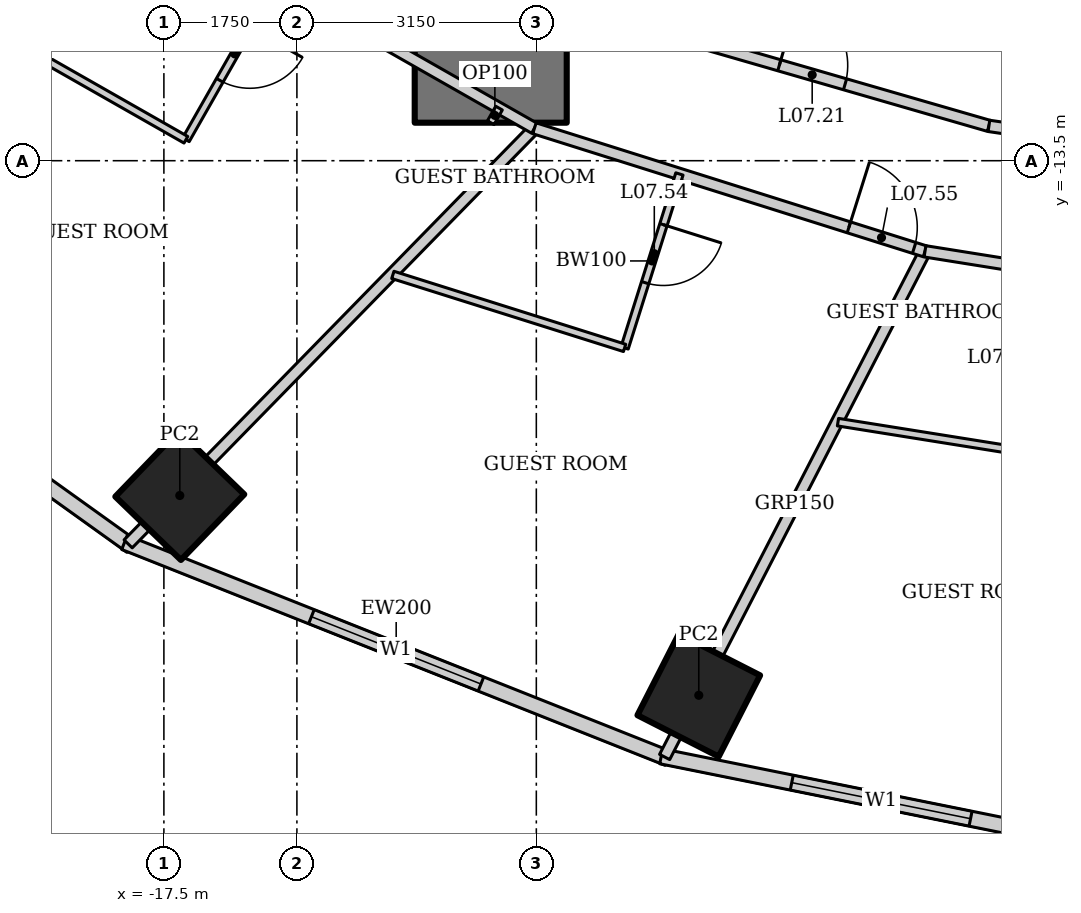
"""IFC4 building model, lengths in metres.
Left out: names, types, materials, properties, quantities, classifications, styles, units other than length and angle.
Written with IfcOpenShell. Run it as: python <this file> out.ifc"""

import sys

from ifc_helpers import new_model, si_unit, direction, frame, frame_2d, origin, origin_2d, place, context, subcontext, project, spatial, rectangle, hollow_rectangle, extrude, element, fill, save


model = new_model("IFC4")
c1 = context("Model", 3, precision=1e-05, world=origin(), true_north=direction((0.0, 1.0)))
c2 = subcontext(c1, "Body", "Model", "MODEL_VIEW")
j1 = project(units=[si_unit("LENGTHUNIT", "METRE"), si_unit("PLANEANGLEUNIT", "RADIAN")], contexts=[c1])
p1 = place(None, origin())
s1 = spatial("IfcSite", under=j1, at=p1, CompositionType="ELEMENT")
p2 = place(p1, origin())
s2 = spatial("IfcBuilding", under=s1, at=p2, CompositionType="ELEMENT")
p3 = place(p2, frame((0.0, 0.0, 40.6)))
s3 = spatial("IfcBuildingStorey", under=s2, at=p3, CompositionType="ELEMENT", Elevation=40.6)
for number, where, z_axis, x_axis in (
    (1, (-17.291, -17.905, 0.0), (0.0, 0.0, 1.0), (0.695, 0.719, 0.0)),
    (2, (-10.463, -20.534, 0.0), (0.0, 0.0, 1.0), (0.454, 0.891, 0.0)),
):
    element("IfcColumn", number, at=place(p3, frame(where, z_axis=z_axis, x_axis=x_axis)), inside=s3, PredefinedType="COLUMN", context=c2, shape_type="SweptSolid", body=[
        extrude(hollow_rectangle(XDim=1.2, YDim=1.2, WallThickness=0.1, at=origin_2d()), origin(), (0.0, 0.0, 1.0), 3.6),
    ])
p4 = place(p3, frame((-13.2, 13.0, 0.0), z_axis=(0.0, 0.0, 1.0), x_axis=(0.0, -1.0, 0.0)))
e3 = element("IfcWall", 3, at=p4, inside=s3, PredefinedType="SHEAR", context=c2, shape_type="SweptSolid", body=[
    extrude(rectangle(XDim=26.0, YDim=2.0, at=frame_2d((13.0, 0.0))), origin(), (0.0, 0.0, 1.0), 3.6),
])
p5 = place(p4, frame((12.1, 0.0, 0.0)))
e4 = element("IfcOpeningElement", 4, at=p5, cuts=e3, PredefinedType="OPENING", context=c2, shape_type="SweptSolid", body=[
    extrude(rectangle(XDim=1.8, YDim=2.1, at=frame_2d((0.9, 1.05))), frame((0.0, 1.01, 0.0), z_axis=(0.0, -1.0, 0.0), x_axis=(1.0, 0.0, 0.0)), (0.0, 0.0, 1.0), 2.02),
])
p6 = place(p3, frame((-24.482, -13.875, 0.0), z_axis=(0.0, 0.0, 1.0), x_axis=(0.812791321576, -0.582554948112, 0.0)))
e5 = element("IfcWall", 5, at=p6, inside=s3, PredefinedType="SOLIDWALL", context=c2, shape_type="SweptSolid", body=[
    extrude(rectangle(XDim=8.063, YDim=0.2, at=frame_2d((4.032, 0.0))), origin(), (0.0, 0.0, 1.0), 3.45),
])
p7 = place(p6, frame((2.832, 0.0, 0.5)))
e6 = element("IfcOpeningElement", 6, at=p7, cuts=e5, PredefinedType="OPENING", context=c2, shape_type="SweptSolid", body=[
    extrude(rectangle(XDim=2.4, YDim=2.2, at=frame_2d((1.2, 1.1))), frame((0.0, 0.11, 0.0), z_axis=(0.0, -1.0, 0.0), x_axis=(1.0, 0.0, 0.0)), (0.0, 0.0, 1.0), 0.22),
])
p8 = place(p3, frame((-18.018, -18.523, 0.0), z_axis=(0.0, 0.0, 1.0), x_axis=(0.929358351251, -0.369178892895, 0.0)))
e7 = element("IfcWall", 7, at=p8, inside=s3, PredefinedType="SOLIDWALL", context=c2, shape_type="SweptSolid", body=[
    extrude(rectangle(XDim=7.692, YDim=0.2, at=frame_2d((3.846, 0.0))), origin(), (0.0, 0.0, 1.0), 3.45),
])
p9 = place(p8, frame((2.646, 0.0, 0.5)))
e8 = element("IfcOpeningElement", 8, at=p9, cuts=e7, PredefinedType="OPENING", context=c2, shape_type="SweptSolid", body=[
    extrude(rectangle(XDim=2.4, YDim=2.2, at=frame_2d((1.2, 1.1))), frame((0.0, 0.11, 0.0), z_axis=(0.0, -1.0, 0.0), x_axis=(1.0, 0.0, 0.0)), (0.0, 0.0, 1.0), 0.22),
])
p10 = place(p3, frame((-10.957, -21.337, 0.0), z_axis=(0.0, 0.0, 1.0), x_axis=(0.980251657452, -0.197754110105, 0.0)))
e9 = element("IfcWall", 9, at=p10, inside=s3, PredefinedType="SOLIDWALL", context=c2, shape_type="SweptSolid", body=[
    extrude(rectangle(XDim=5.904, YDim=0.2, at=frame_2d((2.952, 0.0))), origin(), (0.0, 0.0, 1.0), 3.45),
])
p11 = place(p10, frame((1.752, 0.0, 0.5)))
e10 = element("IfcOpeningElement", 10, at=p11, cuts=e9, PredefinedType="OPENING", context=c2, shape_type="SweptSolid", body=[
    extrude(rectangle(XDim=2.4, YDim=2.2, at=frame_2d((1.2, 1.1))), frame((0.0, 0.11, 0.0), z_axis=(0.0, -1.0, 0.0), x_axis=(1.0, 0.0, 0.0)), (0.0, 0.0, 1.0), 0.22),
])
p12 = place(p3, frame((-24.435, -13.909, 0.0), z_axis=(0.0, 0.0, 1.0), x_axis=(0.871267209855, 0.490808974074, 0.0)))
e11 = element("IfcWall", 11, at=p12, inside=s3, PredefinedType="PARTITIONING", context=c2, shape_type="SweptSolid", body=[
    extrude(rectangle(XDim=7.659, YDim=0.15, at=frame_2d((3.83, 0.0))), origin(), (0.0, 0.0, 1.0), 2.693),
])
p13 = place(p3, frame((-17.97, -18.542, 0.0), z_axis=(0.0, 0.0, 1.0), x_axis=(0.699032031211, 0.715090357467, 0.0)))
e12 = element("IfcWall", 12, at=p13, inside=s3, PredefinedType="PARTITIONING", context=c2, shape_type="SweptSolid", body=[
    extrude(rectangle(XDim=7.647, YDim=0.15, at=frame_2d((3.824, 0.0))), origin(), (0.0, 0.0, 1.0), 2.528),
])
p14 = place(p3, frame((-10.912, -21.346, 0.0), z_axis=(0.0, 0.0, 1.0), x_axis=(0.45777845119, 0.889066302154, 0.0)))
e13 = element("IfcWall", 13, at=p14, inside=s3, PredefinedType="PARTITIONING", context=c2, shape_type="SweptSolid", body=[
    extrude(rectangle(XDim=7.483, YDim=0.15, at=frame_2d((3.742, 0.0))), origin(), (0.0, 0.0, 1.0), 2.528),
])
p15 = place(p3, frame((-17.761, -10.149, 0.0), z_axis=(0.0, 0.0, 1.0), x_axis=(0.86907565943, -0.494679187136, 0.0)))
e14 = element("IfcWall", 14, at=p15, inside=s3, PredefinedType="PARTITIONING", context=c2, shape_type="SweptSolid", body=[
    extrude(rectangle(XDim=5.911, YDim=0.15, at=frame_2d((2.955, 0.0))), origin(), (0.0, 0.0, 1.0), 3.45),
])
p16 = place(p15, frame((2.55, 0.0, 0.0)))
e15 = element("IfcOpeningElement", 15, at=p16, cuts=e14, PredefinedType="OPENING", context=c2, shape_type="SweptSolid", body=[
    extrude(rectangle(XDim=0.9, YDim=2.1, at=frame_2d((0.45, 1.05))), frame((0.0, 0.085, 0.0), z_axis=(0.0, -1.0, 0.0), x_axis=(1.0, 0.0, 0.0)), (0.0, 0.0, 1.0), 0.17),
])
p17 = place(p3, frame((-12.625, -13.073, 0.0), z_axis=(0.0, 0.0, 1.0), x_axis=(0.953774229808, -0.30052407317, 0.0)))
e16 = element("IfcWall", 16, at=p17, inside=s3, PredefinedType="PARTITIONING", context=c2, shape_type="SweptSolid", body=[
    extrude(rectangle(XDim=5.388, YDim=0.15, at=frame_2d((2.694, 0.0))), origin(), (0.0, 0.0, 1.0), 3.45),
])
p18 = place(p17, frame((4.338, 0.0, 0.0)))
e17 = element("IfcOpeningElement", 17, at=p18, cuts=e16, PredefinedType="OPENING", context=c2, shape_type="SweptSolid", body=[
    extrude(rectangle(XDim=0.9, YDim=2.1, at=frame_2d((0.45, 1.05))), frame((0.0, 0.085, 0.0), z_axis=(0.0, -1.0, 0.0), x_axis=(1.0, 0.0, 0.0)), (0.0, 0.0, 1.0), 0.17),
])
p19 = place(p3, frame((-7.486, -14.692, 0.0), z_axis=(0.0, 0.0, 1.0), x_axis=(0.987475660646, -0.157771415761, 0.0)))
e18 = element("IfcWall", 18, at=p19, inside=s3, PredefinedType="PARTITIONING", context=c2, shape_type="SweptSolid", body=[
    extrude(rectangle(XDim=3.999, YDim=0.15, at=frame_2d((1.999, 0.0))), origin(), (0.0, 0.0, 1.0), 3.45),
])
p20 = place(p19, frame((2.1, 0.0, 0.0)))
e19 = element("IfcOpeningElement", 19, at=p20, cuts=e18, PredefinedType="OPENING", context=c2, shape_type="SweptSolid", body=[
    extrude(rectangle(XDim=0.9, YDim=2.1, at=frame_2d((0.45, 1.05))), frame((0.0, 0.085, 0.0), z_axis=(0.0, -1.0, 0.0), x_axis=(1.0, 0.0, 0.0)), (0.0, 0.0, 1.0), 0.17),
])
p21 = place(p3, frame((-11.296, -11.698, 0.0), z_axis=(0.0, 0.0, 1.0), x_axis=(0.960678318068, -0.277663770041, 0.0)))
e20 = element("IfcWall", 20, at=p21, inside=s3, PredefinedType="PARTITIONING", context=c2, shape_type="SweptSolid", body=[
    extrude(rectangle(XDim=4.841, YDim=0.15, at=frame_2d((2.421, 0.0))), origin(), (0.0, 0.0, 1.0), 3.45),
])
p22 = place(p21, frame((1.971, 0.0, 0.0)))
e21 = element("IfcOpeningElement", 21, at=p22, cuts=e20, PredefinedType="OPENING", context=c2, shape_type="SweptSolid", body=[
    extrude(rectangle(XDim=0.9, YDim=2.1, at=frame_2d((0.45, 1.05))), frame((0.0, 0.085, 0.0), z_axis=(0.0, -1.0, 0.0), x_axis=(1.0, 0.0, 0.0)), (0.0, 0.0, 1.0), 0.17),
])
p23 = place(p3, frame((-6.645, -13.042, 0.0), z_axis=(0.0, 0.0, 1.0), x_axis=(0.989443047021, -0.14492224364, 0.0)))
e22 = element("IfcWall", 22, at=p23, inside=s3, PredefinedType="PARTITIONING", context=c2, shape_type="SweptSolid", body=[
    extrude(rectangle(XDim=3.553, YDim=0.15, at=frame_2d((1.776, 0.0))), origin(), (0.0, 0.0, 1.0), 3.45),
])
p24 = place(p3, frame((-16.023, -11.139, 0.0), z_axis=(0.0, 0.0, 1.0), x_axis=(-0.494659381266, -0.869086932663, 0.0)))
e23 = element("IfcWall", 23, at=p24, inside=s3, PredefinedType="PARTITIONING", context=c2, shape_type="SweptSolid", body=[
    extrude(rectangle(XDim=2.4, YDim=0.1, at=frame_2d((1.2, 0.0))), origin(), (0.0, 0.0, 1.0), 3.45),
])
p25 = place(p24, frame((0.7, 0.0, 0.0)))
e24 = element("IfcOpeningElement", 24, at=p25, cuts=e23, PredefinedType="OPENING", context=c2, shape_type="SweptSolid", body=[
    extrude(rectangle(XDim=0.8, YDim=2.1, at=frame_2d((0.4, 1.05))), frame((0.0, 0.06, 0.0), z_axis=(0.0, -1.0, 0.0), x_axis=(1.0, 0.0, 0.0)), (0.0, 0.0, 1.0), 0.12),
])
p26 = place(p3, frame((-17.21, -13.225, 0.0), z_axis=(0.0, 0.0, 1.0), x_axis=(-0.869041592831, 0.494739032147, 0.0)))
e25 = element("IfcWall", 25, at=p26, inside=s3, PredefinedType="PARTITIONING", context=c2, shape_type="SweptSolid", body=[
    extrude(rectangle(XDim=3.42, YDim=0.1, at=frame_2d((1.71, 0.0))), origin(), (0.0, 0.0, 1.0), 3.45),
])
p27 = place(p3, frame((-10.717, -13.674, 0.0), z_axis=(0.0, 0.0, 1.0), x_axis=(-0.30049839721, -0.953782319649, 0.0)))
e26 = element("IfcWall", 26, at=p27, inside=s3, PredefinedType="PARTITIONING", context=c2, shape_type="SweptSolid", body=[
    extrude(rectangle(XDim=2.4, YDim=0.1, at=frame_2d((1.2, 0.0))), origin(), (0.0, 0.0, 1.0), 3.45),
])
p28 = place(p27, frame((0.7, 0.0, 0.0)))
e27 = element("IfcOpeningElement", 27, at=p28, cuts=e26, PredefinedType="OPENING", context=c2, shape_type="SweptSolid", body=[
    extrude(rectangle(XDim=0.8, YDim=2.1, at=frame_2d((0.4, 1.05))), frame((0.0, 0.06, 0.0), z_axis=(0.0, -1.0, 0.0), x_axis=(1.0, 0.0, 0.0)), (0.0, 0.0, 1.0), 0.12),
])
p29 = place(p3, frame((-11.438, -15.963, 0.0), z_axis=(0.0, 0.0, 1.0), x_axis=(-0.953784420519, 0.300491728963, 0.0)))
e28 = element("IfcWall", 28, at=p29, inside=s3, PredefinedType="PARTITIONING", context=c2, shape_type="SweptSolid", body=[
    extrude(rectangle(XDim=3.197, YDim=0.1, at=frame_2d((1.599, 0.0))), origin(), (0.0, 0.0, 1.0), 3.45),
])
p30 = place(p3, frame((-5.89, -17.378, 0.0), z_axis=(0.0, 0.0, 1.0), x_axis=(-0.987476824576, 0.15776413067, 0.0)))
e29 = element("IfcWall", 29, at=p30, inside=s3, PredefinedType="PARTITIONING", context=c2, shape_type="SweptSolid", body=[
    extrude(rectangle(XDim=2.776, YDim=0.1, at=frame_2d((1.388, 0.0))), origin(), (0.0, 0.0, 1.0), 3.45),
])
p31 = place(p3, frame((-13.2, -13.0, 0.0), z_axis=(0.0, 0.0, 1.0), x_axis=(0.49435138335, 0.869262164011, 0.0)))
e30 = element("IfcWall", 30, at=p31, inside=s3, PredefinedType="PARTITIONING", context=c2, shape_type="SweptSolid", body=[
    extrude(rectangle(XDim=0.221, YDim=0.1, at=frame_2d((0.11, 0.0))), origin(), (0.0, 0.0, 1.0), 3.45),
])
p32 = place(p9, origin())
e31 = element("IfcWindow", 31, at=p32, inside=s3, PartitioningType="SINGLE_PANEL", PredefinedType="WINDOW", context=c2, shape_type="SweptSolid", body=[
    extrude(rectangle(XDim=2.4, YDim=2.2, at=frame_2d((1.2, 1.1))), frame((0.0, 0.03, 0.0), z_axis=(0.0, -1.0, 0.0), x_axis=(1.0, 0.0, 0.0)), (0.0, 0.0, 1.0), 0.06),
])
fill(e8, e31)
p33 = place(p11, origin())
e32 = element("IfcWindow", 32, at=p33, inside=s3, PartitioningType="SINGLE_PANEL", PredefinedType="WINDOW", context=c2, shape_type="SweptSolid", body=[
    extrude(rectangle(XDim=2.4, YDim=2.2, at=frame_2d((1.2, 1.1))), frame((0.0, 0.03, 0.0), z_axis=(0.0, -1.0, 0.0), x_axis=(1.0, 0.0, 0.0)), (0.0, 0.0, 1.0), 0.06),
])
fill(e10, e32)
p34 = place(p22, origin())
e33 = element("IfcDoor", 33, at=p34, inside=s3, OperationType="SINGLE_SWING_LEFT", PredefinedType="DOOR", context=c2, shape_type="SweptSolid", body=[
    extrude(rectangle(XDim=0.9, YDim=2.1, at=frame_2d((0.45, 1.05))), frame((0.0, 0.025, 0.0), z_axis=(0.0, -1.0, 0.0), x_axis=(1.0, 0.0, 0.0)), (0.0, 0.0, 1.0), 0.05),
])
fill(e21, e33)
p35 = place(p25, origin())
e34 = element("IfcDoor", 34, at=p35, inside=s3, OperationType="SINGLE_SWING_LEFT", PredefinedType="DOOR", context=c2, shape_type="SweptSolid", body=[
    extrude(rectangle(XDim=0.8, YDim=2.1, at=frame_2d((0.4, 1.05))), frame((0.0, 0.025, 0.0), z_axis=(0.0, -1.0, 0.0), x_axis=(1.0, 0.0, 0.0)), (0.0, 0.0, 1.0), 0.05),
])
fill(e24, e34)
p36 = place(p28, origin())
e35 = element("IfcDoor", 35, at=p36, inside=s3, OperationType="SINGLE_SWING_LEFT", PredefinedType="DOOR", context=c2, shape_type="SweptSolid", body=[
    extrude(rectangle(XDim=0.8, YDim=2.1, at=frame_2d((0.4, 1.05))), frame((0.0, 0.025, 0.0), z_axis=(0.0, -1.0, 0.0), x_axis=(1.0, 0.0, 0.0)), (0.0, 0.0, 1.0), 0.05),
])
fill(e27, e35)
p37 = place(p18, origin())
e36 = element("IfcDoor", 36, at=p37, inside=s3, OperationType="SINGLE_SWING_LEFT", PredefinedType="DOOR", context=c2, shape_type="SweptSolid", body=[
    extrude(rectangle(XDim=0.9, YDim=2.1, at=frame_2d((0.45, 1.05))), frame((0.0, 0.025, 0.0), z_axis=(0.0, -1.0, 0.0), x_axis=(1.0, 0.0, 0.0)), (0.0, 0.0, 1.0), 0.05),
])
fill(e17, e36)
save(model, sys.argv[1])
